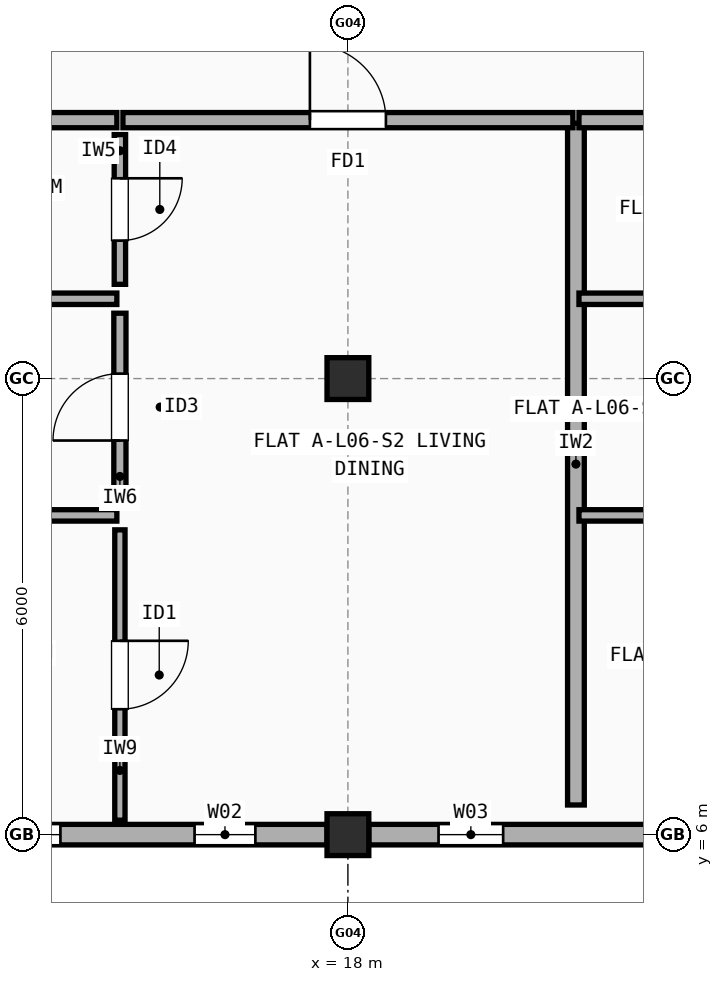
"""IFC4 building model, lengths in metres.
Left out: names, types, materials, properties, quantities, classifications, styles, units other than length and angle.
Written with IfcOpenShell. Run it as: python <this file> out.ifc"""

import sys

from ifc_helpers import new_model, si_unit, direction, frame, frame_2d, origin, origin_2d, place, context, subcontext, project, spatial, rectangle, extrude, element, fill, save


model = new_model("IFC4")
c1 = context("Model", 3, precision=1e-05, world=origin(), true_north=direction((0.0, 1.0)))
c2 = subcontext(c1, "Body", "Model", "MODEL_VIEW")
j1 = project(units=[si_unit("LENGTHUNIT", "METRE"), si_unit("PLANEANGLEUNIT", "RADIAN")], contexts=[c1])
p1 = place(None, origin())
s1 = spatial("IfcSite", under=j1, at=p1, CompositionType="ELEMENT")
p2 = place(p1, origin())
s2 = spatial("IfcBuilding", under=s1, at=p2, CompositionType="ELEMENT")
p3 = place(p2, frame((0.0, 0.0, 20.5)))
s3 = spatial("IfcBuildingStorey", under=s2, at=p3, CompositionType="ELEMENT", Elevation=20.5)
for number, where, z_axis, x_axis in (
    (1, (18.0, 6.0, 0.0), (0.0, 0.0, 1.0), (1.0, 0.0, 0.0)),
    (2, (18.0, 12.0, 0.0), (0.0, 0.0, 1.0), (1.0, 0.0, 0.0)),
):
    element("IfcColumn", number, at=place(p3, frame(where, z_axis=z_axis, x_axis=x_axis)), inside=s3, PredefinedType="COLUMN", context=c2, shape_type="SweptSolid", body=[
        extrude(rectangle(XDim=0.55, YDim=0.55, at=origin_2d()), origin(), (0.0, 0.0, 1.0), 2.97),
    ])
p4 = place(p3, frame((12.275, 6.0, 0.0), z_axis=(0.0, 0.0, 1.0), x_axis=(1.0, 0.0, 0.0)))
e3 = element("IfcWall", 3, at=p4, inside=s3, PredefinedType="STANDARD", context=c2, shape_type="SweptSolid", body=[
    extrude(rectangle(XDim=5.45, YDim=0.27, at=frame_2d((2.725, 0.0))), origin(), (0.0, 0.0, 1.0), 2.452),
])
p5 = place(p4, frame((0.742, 0.0, 0.9)))
e4 = element("IfcOpeningElement", 4, at=p5, cuts=e3, PredefinedType="OPENING", context=c2, shape_type="SweptSolid", body=[
    extrude(rectangle(XDim=1.2, YDim=1.35, at=frame_2d((0.6, 0.675))), frame((0.0, 0.145, 0.0), z_axis=(0.0, -1.0, 0.0), x_axis=(1.0, 0.0, 0.0)), (0.0, 0.0, 1.0), 0.29),
])
p6 = place(p4, frame((3.708, 0.0, 0.9)))
e5 = element("IfcOpeningElement", 5, at=p6, cuts=e3, PredefinedType="OPENING", context=c2, shape_type="SweptSolid", body=[
    extrude(rectangle(XDim=0.8, YDim=1.2, at=frame_2d((0.4, 0.6))), frame((0.0, 0.145, 0.0), z_axis=(0.0, -1.0, 0.0), x_axis=(1.0, 0.0, 0.0)), (0.0, 0.0, 1.0), 0.29),
])
p7 = place(p3, frame((18.275, 6.0, 0.0), z_axis=(0.0, 0.0, 1.0), x_axis=(1.0, 0.0, 0.0)))
e6 = element("IfcWall", 6, at=p7, inside=s3, PredefinedType="STANDARD", context=c2, shape_type="SweptSolid", body=[
    extrude(rectangle(XDim=5.45, YDim=0.27, at=frame_2d((2.725, 0.0))), origin(), (0.0, 0.0, 1.0), 2.452),
])
p8 = place(p7, frame((0.917, 0.0, 0.9)))
e7 = element("IfcOpeningElement", 7, at=p8, cuts=e6, PredefinedType="OPENING", context=c2, shape_type="SweptSolid", body=[
    extrude(rectangle(XDim=0.85, YDim=1.25, at=frame_2d((0.425, 0.625))), frame((0.0, 0.145, 0.0), z_axis=(0.0, -1.0, 0.0), x_axis=(1.0, 0.0, 0.0)), (0.0, 0.0, 1.0), 0.29),
])
p9 = place(p7, frame((3.657, 0.0, 0.9)))
e8 = element("IfcOpeningElement", 8, at=p9, cuts=e6, PredefinedType="OPENING", context=c2, shape_type="SweptSolid", body=[
    extrude(rectangle(XDim=0.9, YDim=1.3, at=frame_2d((0.45, 0.65))), frame((0.0, 0.145, 0.0), z_axis=(0.0, -1.0, 0.0), x_axis=(1.0, 0.0, 0.0)), (0.0, 0.0, 1.0), 0.29),
])
p10 = place(p3, frame((21.0, 6.39, 0.0), z_axis=(0.0, 0.0, 1.0), x_axis=(0.0, 1.0, 0.0)))
e9 = element("IfcWall", 9, at=p10, inside=s3, PredefinedType="SOLIDWALL", context=c2, shape_type="SweptSolid", body=[
    extrude(rectangle(XDim=8.97, YDim=0.22, at=frame_2d((4.485, 0.0))), origin(), (0.0, 0.0, 1.0), 2.548),
])
p11 = place(p3, frame((10.54, 15.4, 0.0), z_axis=(0.0, 0.0, 1.0), x_axis=(1.0, 0.0, 0.0)))
e10 = element("IfcWall", 10, at=p11, inside=s3, PredefinedType="SOLIDWALL", context=c2, shape_type="SweptSolid", body=[
    extrude(rectangle(XDim=4.42, YDim=0.2, at=frame_2d((2.21, 0.0))), origin(), (0.0, 0.0, 1.0), 2.548),
])
p12 = place(p3, frame((15.04, 15.4, 0.0), z_axis=(0.0, 0.0, 1.0), x_axis=(1.0, 0.0, 0.0)))
e11 = element("IfcWall", 11, at=p12, inside=s3, PredefinedType="SOLIDWALL", context=c2, shape_type="SweptSolid", body=[
    extrude(rectangle(XDim=5.92, YDim=0.2, at=frame_2d((2.96, 0.0))), origin(), (0.0, 0.0, 1.0), 2.508),
])
p13 = place(p12, frame((2.46, 0.0, 0.0)))
e12 = element("IfcOpeningElement", 12, at=p13, cuts=e11, PredefinedType="OPENING", context=c2, shape_type="SweptSolid", body=[
    extrude(rectangle(XDim=1.0, YDim=2.15, at=frame_2d((0.5, 1.075))), frame((0.0, 0.11, 0.0), z_axis=(0.0, -1.0, 0.0), x_axis=(1.0, 0.0, 0.0)), (0.0, 0.0, 1.0), 0.22),
])
p14 = place(p3, frame((15.0, 6.19, 0.0), z_axis=(0.0, 0.0, 1.0), x_axis=(0.0, 1.0, 0.0)))
e13 = element("IfcWall", 13, at=p14, inside=s3, PredefinedType="PARTITIONING", context=c2, shape_type="SweptSolid", body=[
    extrude(rectangle(XDim=3.82, YDim=0.135, at=frame_2d((1.91, 0.0))), origin(), (0.0, 0.0, 1.0), 2.97),
])
p15 = place(p14, frame((1.46, 0.0, 0.0)))
e14 = element("IfcOpeningElement", 14, at=p15, cuts=e13, PredefinedType="OPENING", context=c2, shape_type="SweptSolid", body=[
    extrude(rectangle(XDim=0.9, YDim=2.1, at=frame_2d((0.45, 1.05))), frame((0.0, 0.077, 0.0), z_axis=(0.0, -1.0, 0.0), x_axis=(1.0, 0.0, 0.0)), (0.0, 0.0, 1.0), 0.155),
])
p16 = place(p3, frame((15.0, 10.39, 0.0), z_axis=(0.0, 0.0, 1.0), x_axis=(0.0, 1.0, 0.0)))
e15 = element("IfcWall", 15, at=p16, inside=s3, PredefinedType="PLUMBINGWALL", context=c2, shape_type="SweptSolid", body=[
    extrude(rectangle(XDim=2.47, YDim=0.16, at=frame_2d((1.235, 0.0))), origin(), (0.0, 0.0, 1.0), 2.408),
])
p17 = place(p16, frame((0.795, 0.0, 0.0)))
e16 = element("IfcOpeningElement", 16, at=p17, cuts=e15, PredefinedType="OPENING", context=c2, shape_type="SweptSolid", body=[
    extrude(rectangle(XDim=0.88, YDim=2.1, at=frame_2d((0.44, 1.05))), frame((0.0, 0.09, 0.0), z_axis=(0.0, -1.0, 0.0), x_axis=(1.0, 0.0, 0.0)), (0.0, 0.0, 1.0), 0.18),
])
p18 = place(p3, frame((15.0, 13.24, 0.0), z_axis=(0.0, 0.0, 1.0), x_axis=(0.0, 1.0, 0.0)))
e17 = element("IfcWall", 17, at=p18, inside=s3, PredefinedType="PARTITIONING", context=c2, shape_type="SweptSolid", body=[
    extrude(rectangle(XDim=1.97, YDim=0.15, at=frame_2d((0.985, 0.0))), origin(), (0.0, 0.0, 1.0), 2.97),
])
p19 = place(p18, frame((0.575, 0.0, 0.0)))
e18 = element("IfcOpeningElement", 18, at=p19, cuts=e17, PredefinedType="OPENING", context=c2, shape_type="SweptSolid", body=[
    extrude(rectangle(XDim=0.82, YDim=2.08, at=frame_2d((0.41, 1.04))), frame((0.0, 0.085, 0.0), z_axis=(0.0, -1.0, 0.0), x_axis=(1.0, 0.0, 0.0)), (0.0, 0.0, 1.0), 0.17),
])
p20 = place(p3, frame((10.54, 10.2, 0.0), z_axis=(0.0, 0.0, 1.0), x_axis=(1.0, 0.0, 0.0)))
e19 = element("IfcWall", 19, at=p20, inside=s3, PredefinedType="PARTITIONING", context=c2, shape_type="SweptSolid", body=[
    extrude(rectangle(XDim=4.42, YDim=0.15, at=frame_2d((2.21, 0.0))), origin(), (0.0, 0.0, 1.0), 2.458),
])
p21 = place(p3, frame((10.54, 13.05, 0.0), z_axis=(0.0, 0.0, 1.0), x_axis=(1.0, 0.0, 0.0)))
e20 = element("IfcWall", 20, at=p21, inside=s3, PredefinedType="PARTITIONING", context=c2, shape_type="SweptSolid", body=[
    extrude(rectangle(XDim=4.42, YDim=0.15, at=frame_2d((2.21, 0.0))), origin(), (0.0, 0.0, 1.0), 2.548),
])
p22 = place(p3, frame((21.04, 15.4, 0.0), z_axis=(0.0, 0.0, 1.0), x_axis=(1.0, 0.0, 0.0)))
e21 = element("IfcWall", 21, at=p22, inside=s3, PredefinedType="SOLIDWALL", context=c2, shape_type="SweptSolid", body=[
    extrude(rectangle(XDim=4.42, YDim=0.2, at=frame_2d((2.21, 0.0))), origin(), (0.0, 0.0, 1.0), 2.508),
])
p23 = place(p3, frame((21.04, 10.2, 0.0), z_axis=(0.0, 0.0, 1.0), x_axis=(1.0, 0.0, 0.0)))
e22 = element("IfcWall", 22, at=p23, inside=s3, PredefinedType="PARTITIONING", context=c2, shape_type="SweptSolid", body=[
    extrude(rectangle(XDim=4.42, YDim=0.15, at=frame_2d((2.21, 0.0))), origin(), (0.0, 0.0, 1.0), 2.548),
])
p24 = place(p3, frame((21.04, 13.05, 0.0), z_axis=(0.0, 0.0, 1.0), x_axis=(1.0, 0.0, 0.0)))
e23 = element("IfcWall", 23, at=p24, inside=s3, PredefinedType="PARTITIONING", context=c2, shape_type="SweptSolid", body=[
    extrude(rectangle(XDim=4.42, YDim=0.15, at=frame_2d((2.21, 0.0))), origin(), (0.0, 0.0, 1.0), 2.508),
])
p25 = place(p5, origin())
e24 = element("IfcWindow", 24, at=p25, inside=s3, PartitioningType="SINGLE_PANEL", PredefinedType="WINDOW", context=c2, shape_type="SweptSolid", body=[
    extrude(rectangle(XDim=1.2, YDim=1.35, at=frame_2d((0.6, 0.675))), frame((0.0, 0.03, 0.0), z_axis=(0.0, -1.0, 0.0), x_axis=(1.0, 0.0, 0.0)), (0.0, 0.0, 1.0), 0.06),
])
fill(e4, e24)
p26 = place(p6, origin())
e25 = element("IfcWindow", 25, at=p26, inside=s3, PartitioningType="SINGLE_PANEL", PredefinedType="WINDOW", context=c2, shape_type="SweptSolid", body=[
    extrude(rectangle(XDim=0.8, YDim=1.2, at=frame_2d((0.4, 0.6))), frame((0.0, 0.03, 0.0), z_axis=(0.0, -1.0, 0.0), x_axis=(1.0, 0.0, 0.0)), (0.0, 0.0, 1.0), 0.06),
])
fill(e5, e25)
p27 = place(p8, origin())
e26 = element("IfcWindow", 26, at=p27, inside=s3, PartitioningType="SINGLE_PANEL", PredefinedType="WINDOW", context=c2, shape_type="SweptSolid", body=[
    extrude(rectangle(XDim=0.85, YDim=1.25, at=frame_2d((0.425, 0.625))), frame((0.0, 0.03, 0.0), z_axis=(0.0, -1.0, 0.0), x_axis=(1.0, 0.0, 0.0)), (0.0, 0.0, 1.0), 0.06),
])
fill(e7, e26)
p28 = place(p13, origin())
e27 = element("IfcDoor", 27, at=p28, inside=s3, OperationType="SINGLE_SWING_LEFT", PredefinedType="DOOR", context=c2, shape_type="SweptSolid", body=[
    extrude(rectangle(XDim=1.0, YDim=2.15, at=frame_2d((0.5, 1.075))), frame((0.0, 0.025, 0.0), z_axis=(0.0, -1.0, 0.0), x_axis=(1.0, 0.0, 0.0)), (0.0, 0.0, 1.0), 0.05),
])
fill(e12, e27)
p29 = place(p15, origin())
e28 = element("IfcDoor", 28, at=p29, inside=s3, OperationType="SINGLE_SWING_RIGHT", PredefinedType="DOOR", context=c2, shape_type="SweptSolid", body=[
    extrude(rectangle(XDim=0.9, YDim=2.1, at=frame_2d((0.45, 1.05))), frame((0.0, 0.025, 0.0), z_axis=(0.0, -1.0, 0.0), x_axis=(1.0, 0.0, 0.0)), (0.0, 0.0, 1.0), 0.05),
])
fill(e14, e28)
p30 = place(p17, origin())
e29 = element("IfcDoor", 29, at=p30, inside=s3, OperationType="SINGLE_SWING_LEFT", PredefinedType="DOOR", context=c2, shape_type="SweptSolid", body=[
    extrude(rectangle(XDim=0.88, YDim=2.1, at=frame_2d((0.44, 1.05))), frame((0.0, 0.025, 0.0), z_axis=(0.0, -1.0, 0.0), x_axis=(1.0, 0.0, 0.0)), (0.0, 0.0, 1.0), 0.05),
])
fill(e16, e29)
p31 = place(p19, origin())
e30 = element("IfcDoor", 30, at=p31, inside=s3, OperationType="SINGLE_SWING_RIGHT", PredefinedType="DOOR", context=c2, shape_type="SweptSolid", body=[
    extrude(rectangle(XDim=0.82, YDim=2.08, at=frame_2d((0.41, 1.04))), frame((0.0, 0.025, 0.0), z_axis=(0.0, -1.0, 0.0), x_axis=(1.0, 0.0, 0.0)), (0.0, 0.0, 1.0), 0.05),
])
fill(e18, e30)
save(model, sys.argv[1])
